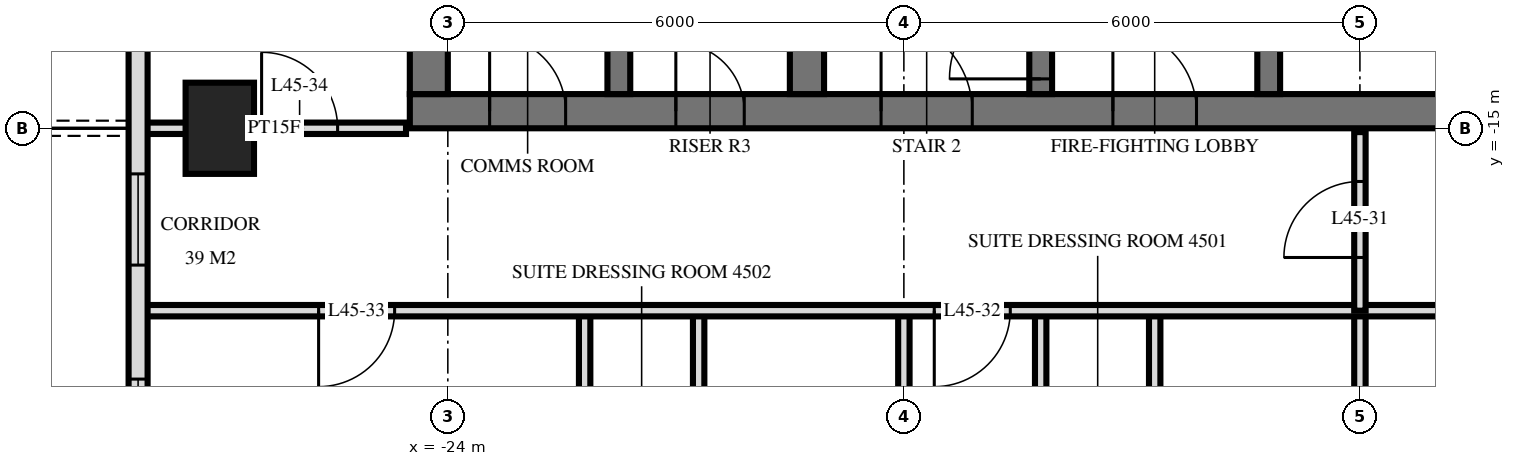
"""IFC4 building model, lengths in metres.
Left out: names, types, materials, properties, quantities, classifications, styles, units other than length and angle.
Written with IfcOpenShell. Run it as: python <this file> out.ifc"""

import sys

from ifc_helpers import new_model, si_unit, direction, frame, frame_2d, origin, origin_2d, place, context, subcontext, project, spatial, rectangle, extrude, element, fill, save


model = new_model("IFC4")
c1 = context("Model", 3, precision=1e-05, world=origin(), true_north=direction((0.0, 1.0)))
c2 = subcontext(c1, "Body", "Model", "MODEL_VIEW")
j1 = project(units=[si_unit("LENGTHUNIT", "METRE"), si_unit("PLANEANGLEUNIT", "RADIAN")], contexts=[c1])
p1 = place(None, origin())
s1 = spatial("IfcSite", under=j1, at=p1, CompositionType="ELEMENT")
p2 = place(p1, origin())
s2 = spatial("IfcBuilding", under=s1, at=p2, CompositionType="ELEMENT")
p3 = place(p2, frame((0.0, 0.0, 174.0)))
s3 = spatial("IfcBuildingStorey", under=s2, at=p3, CompositionType="ELEMENT", Elevation=174.0)
p4 = place(p3, frame((-27.0, -15.0, 0.0), z_axis=(0.0, 0.0, 1.0), x_axis=(0.0, 1.0, 0.0)))
e1 = element("IfcColumn", 1, at=p4, inside=s3, PredefinedType="COLUMN", context=c2, shape_type="SweptSolid", body=[
    extrude(rectangle(XDim=1.2, YDim=0.9, at=origin_2d()), origin(), (0.0, 0.0, 1.0), 3.6),
])
p5 = place(p3, frame((-24.5, -14.775, 0.0), z_axis=(0.0, 0.0, 1.0), x_axis=(1.0, 0.0, 0.0)))
e2 = element("IfcWall", 2, at=p5, inside=s3, PredefinedType="SHEAR", context=c2, shape_type="SweptSolid", body=[
    extrude(rectangle(XDim=14.5, YDim=0.45, at=frame_2d((7.25, 0.0))), origin(), (0.0, 0.0, 1.0), 3.6),
])
p6 = place(p5, frame((6.2, 0.0, 0.0)))
e3 = element("IfcOpeningElement", 3, at=p6, cuts=e2, PredefinedType="OPENING", context=c2, shape_type="SweptSolid", body=[
    extrude(rectangle(XDim=1.2, YDim=2.1, at=frame_2d((0.6, 1.05))), frame((0.0, 0.235, 0.0), z_axis=(0.0, -1.0, 0.0), x_axis=(1.0, 0.0, 0.0)), (0.0, 0.0, 1.0), 0.47),
])
p7 = place(p5, frame((9.25, 0.0, 0.0)))
e4 = element("IfcOpeningElement", 4, at=p7, cuts=e2, PredefinedType="OPENING", context=c2, shape_type="SweptSolid", body=[
    extrude(rectangle(XDim=1.1, YDim=2.1, at=frame_2d((0.55, 1.05))), frame((0.0, 0.235, 0.0), z_axis=(0.0, -1.0, 0.0), x_axis=(1.0, 0.0, 0.0)), (0.0, 0.0, 1.0), 0.47),
])
p8 = place(p5, frame((3.5, 0.0, 0.0)))
e5 = element("IfcOpeningElement", 5, at=p8, cuts=e2, PredefinedType="OPENING", context=c2, shape_type="SweptSolid", body=[
    extrude(rectangle(XDim=0.9, YDim=2.1, at=frame_2d((0.45, 1.05))), frame((0.0, 0.235, 0.0), z_axis=(0.0, -1.0, 0.0), x_axis=(1.0, 0.0, 0.0)), (0.0, 0.0, 1.0), 0.47),
])
p9 = place(p5, frame((1.05, 0.0, 0.0)))
e6 = element("IfcOpeningElement", 6, at=p9, cuts=e2, PredefinedType="OPENING", context=c2, shape_type="SweptSolid", body=[
    extrude(rectangle(XDim=1.0, YDim=2.1, at=frame_2d((0.5, 1.05))), frame((0.0, 0.235, 0.0), z_axis=(0.0, -1.0, 0.0), x_axis=(1.0, 0.0, 0.0)), (0.0, 0.0, 1.0), 0.47),
])
p10 = place(p3, frame((-24.25, -14.55, 0.0), z_axis=(0.0, 0.0, 1.0), x_axis=(0.0, 1.0, 0.0)))
e7 = element("IfcWall", 7, at=p10, inside=s3, PredefinedType="SHEAR", context=c2, shape_type="SweptSolid", body=[
    extrude(rectangle(XDim=14.1, YDim=0.5, at=frame_2d((7.05, 0.0))), origin(), (0.0, 0.0, 1.0), 3.6),
])
p11 = place(p3, frame((-13.2, -14.55, 0.0), z_axis=(0.0, 0.0, 1.0), x_axis=(0.0, 1.0, 0.0)))
e8 = element("IfcWall", 8, at=p11, inside=s3, PredefinedType="SHEAR", context=c2, shape_type="SweptSolid", body=[
    extrude(rectangle(XDim=5.4, YDim=0.3, at=frame_2d((2.7, 0.0))), origin(), (0.0, 0.0, 1.0), 3.6),
])
p12 = place(p11, frame((4.0, 0.0, 0.0)))
e9 = element("IfcOpeningElement", 9, at=p12, cuts=e8, PredefinedType="OPENING", context=c2, shape_type="SweptSolid", body=[
    extrude(rectangle(XDim=1.2, YDim=2.1, at=frame_2d((0.6, 1.05))), frame((0.0, 0.16, 0.0), z_axis=(0.0, -1.0, 0.0), x_axis=(1.0, 0.0, 0.0)), (0.0, 0.0, 1.0), 0.32),
])
p13 = place(p3, frame((-16.2, -14.55, 0.0), z_axis=(0.0, 0.0, 1.0), x_axis=(0.0, 1.0, 0.0)))
e10 = element("IfcWall", 10, at=p13, inside=s3, PredefinedType="SHEAR", context=c2, shape_type="SweptSolid", body=[
    extrude(rectangle(XDim=5.4, YDim=0.3, at=frame_2d((2.7, 0.0))), origin(), (0.0, 0.0, 1.0), 3.6),
])
p14 = place(p13, frame((0.2, 0.0, 0.0)))
e11 = element("IfcOpeningElement", 11, at=p14, cuts=e10, PredefinedType="OPENING", context=c2, shape_type="SweptSolid", body=[
    extrude(rectangle(XDim=1.2, YDim=2.1, at=frame_2d((0.6, 1.05))), frame((0.0, 0.16, 0.0), z_axis=(0.0, -1.0, 0.0), x_axis=(1.0, 0.0, 0.0)), (0.0, 0.0, 1.0), 0.32),
])
p15 = place(p3, frame((-19.275, -14.55, 0.0), z_axis=(0.0, 0.0, 1.0), x_axis=(0.0, 1.0, 0.0)))
e12 = element("IfcWall", 12, at=p15, inside=s3, PredefinedType="SHEAR", context=c2, shape_type="SweptSolid", body=[
    extrude(rectangle(XDim=5.4, YDim=0.45, at=frame_2d((2.7, 0.0))), origin(), (0.0, 0.0, 1.0), 3.6),
])
p16 = place(p3, frame((-21.75, -14.55, 0.0), z_axis=(0.0, 0.0, 1.0), x_axis=(0.0, 1.0, 0.0)))
e13 = element("IfcWall", 13, at=p16, inside=s3, PredefinedType="SHEAR", context=c2, shape_type="SweptSolid", body=[
    extrude(rectangle(XDim=5.4, YDim=0.3, at=frame_2d((2.7, 0.0))), origin(), (0.0, 0.0, 1.0), 3.6),
])
p17 = place(p3, frame((-28.075, -3.325, 0.0), z_axis=(0.0, 0.0, 1.0), x_axis=(0.0, -1.0, 0.0)))
e14 = element("IfcWall", 14, at=p17, inside=s3, PredefinedType="SOLIDWALL", context=c2, shape_type="SweptSolid", body=[
    extrude(rectangle(XDim=25.951, YDim=0.25, at=frame_2d((12.975, 0.0))), origin(), (0.0, 0.0, 1.0), 3.3),
])
p18 = place(p17, frame((7.525, 0.0, 0.0)))
e15 = element("IfcOpeningElement", 15, at=p18, cuts=e14, PredefinedType="OPENING", context=c2, shape_type="SweptSolid", body=[
    extrude(rectangle(XDim=1.8, YDim=2.4, at=frame_2d((0.9, 1.2))), frame((0.0, 0.135, 0.0), z_axis=(0.0, -1.0, 0.0), x_axis=(1.0, 0.0, 0.0)), (0.0, 0.0, 1.0), 0.27),
])
p19 = place(p17, frame((12.275, 0.0, 0.3)))
e16 = element("IfcOpeningElement", 16, at=p19, cuts=e14, PredefinedType="OPENING", context=c2, shape_type="SweptSolid", body=[
    extrude(rectangle(XDim=1.2, YDim=2.1, at=frame_2d((0.6, 1.05))), frame((0.0, 0.135, 0.0), z_axis=(0.0, -1.0, 0.0), x_axis=(1.0, 0.0, 0.0)), (0.0, 0.0, 1.0), 0.27),
])
p20 = place(p17, frame((14.975, 0.0, 0.3)))
e17 = element("IfcOpeningElement", 17, at=p20, cuts=e14, PredefinedType="OPENING", context=c2, shape_type="SweptSolid", body=[
    extrude(rectangle(XDim=2.4, YDim=2.1, at=frame_2d((1.2, 1.05))), frame((0.0, 0.135, 0.0), z_axis=(0.0, -1.0, 0.0), x_axis=(1.0, 0.0, 0.0)), (0.0, 0.0, 1.0), 0.27),
])
p21 = place(p17, frame((18.175, 0.0, 0.0)))
e18 = element("IfcOpeningElement", 18, at=p21, cuts=e14, PredefinedType="OPENING", context=c2, shape_type="SweptSolid", body=[
    extrude(rectangle(XDim=1.8, YDim=2.4, at=frame_2d((0.9, 1.2))), frame((0.0, 0.135, 0.0), z_axis=(0.0, -1.0, 0.0), x_axis=(1.0, 0.0, 0.0)), (0.0, 0.0, 1.0), 0.27),
])
p22 = place(p17, frame((21.075, 0.0, 0.0)))
e19 = element("IfcOpeningElement", 19, at=p22, cuts=e14, PredefinedType="OPENING", context=c2, shape_type="SweptSolid", body=[
    extrude(rectangle(XDim=1.8, YDim=2.4, at=frame_2d((0.9, 1.2))), frame((0.0, 0.135, 0.0), z_axis=(0.0, -1.0, 0.0), x_axis=(1.0, 0.0, 0.0)), (0.0, 0.0, 1.0), 0.27),
])
p23 = place(p17, frame((23.825, 0.0, 0.3)))
e20 = element("IfcOpeningElement", 20, at=p23, cuts=e14, PredefinedType="OPENING", context=c2, shape_type="SweptSolid", body=[
    extrude(rectangle(XDim=1.8, YDim=2.1, at=frame_2d((0.9, 1.05))), frame((0.0, 0.135, 0.0), z_axis=(0.0, -1.0, 0.0), x_axis=(1.0, 0.0, 0.0)), (0.0, 0.0, 1.0), 0.27),
])
p24 = place(p3, frame((-12.0, -17.4, 0.0), z_axis=(0.0, 0.0, 1.0), x_axis=(0.0, 1.0, 0.0)))
e21 = element("IfcWall", 21, at=p24, inside=s3, PredefinedType="PARTITIONING", context=c2, shape_type="SweptSolid", body=[
    extrude(rectangle(XDim=2.35, YDim=0.15, at=frame_2d((1.175, 0.0))), origin(), (0.0, 0.0, 1.0), 3.32),
])
p25 = place(p24, frame((0.7, 0.0, 0.0)))
e22 = element("IfcOpeningElement", 22, at=p25, cuts=e21, PredefinedType="OPENING", context=c2, shape_type="SweptSolid", body=[
    extrude(rectangle(XDim=1.0, YDim=2.1, at=frame_2d((0.5, 1.05))), frame((0.0, 0.085, 0.0), z_axis=(0.0, -1.0, 0.0), x_axis=(1.0, 0.0, 0.0)), (0.0, 0.0, 1.0), 0.17),
])
p26 = place(p3, frame((-12.0, -33.62, 0.0), z_axis=(0.0, 0.0, 1.0), x_axis=(0.0, 1.0, 0.0)))
e23 = element("IfcWall", 23, at=p26, inside=s3, PredefinedType="PARTITIONING", context=c2, shape_type="SweptSolid", body=[
    extrude(rectangle(XDim=16.22, YDim=0.15, at=frame_2d((8.11, 0.0))), origin(), (0.0, 0.0, 1.0), 3.32),
])
p27 = place(p3, frame((-14.7, -22.4, 0.0), z_axis=(0.0, 0.0, 1.0), x_axis=(0.0, 1.0, 0.0)))
e24 = element("IfcWall", 24, at=p27, inside=s3, PredefinedType="PARTITIONING", context=c2, shape_type="SweptSolid", body=[
    extrude(rectangle(XDim=5.0, YDim=0.15, at=frame_2d((2.5, 0.0))), origin(), (0.0, 0.0, 1.0), 3.32),
])
p28 = place(p3, frame((-16.2, -22.4, 0.0), z_axis=(0.0, 0.0, 1.0), x_axis=(0.0, 1.0, 0.0)))
e25 = element("IfcWall", 25, at=p28, inside=s3, PredefinedType="PARTITIONING", context=c2, shape_type="SweptSolid", body=[
    extrude(rectangle(XDim=5.0, YDim=0.15, at=frame_2d((2.5, 0.0))), origin(), (0.0, 0.0, 1.0), 3.32),
])
p29 = place(p28, frame((2.05, 0.0, 0.0)))
e26 = element("IfcOpeningElement", 26, at=p29, cuts=e25, PredefinedType="OPENING", context=c2, shape_type="SweptSolid", body=[
    extrude(rectangle(XDim=0.9, YDim=2.1, at=frame_2d((0.45, 1.05))), frame((0.0, 0.085, 0.0), z_axis=(0.0, -1.0, 0.0), x_axis=(1.0, 0.0, 0.0)), (0.0, 0.0, 1.0), 0.17),
])
p30 = place(p3, frame((-18.0, -33.62, 0.0), z_axis=(0.0, 0.0, 1.0), x_axis=(0.0, 1.0, 0.0)))
e27 = element("IfcWall", 27, at=p30, inside=s3, PredefinedType="PARTITIONING", context=c2, shape_type="SweptSolid", body=[
    extrude(rectangle(XDim=16.22, YDim=0.15, at=frame_2d((8.11, 0.0))), origin(), (0.0, 0.0, 1.0), 3.32),
])
p31 = place(p3, frame((-20.7, -21.6, 0.0), z_axis=(0.0, 0.0, 1.0), x_axis=(0.0, 1.0, 0.0)))
e28 = element("IfcWall", 28, at=p31, inside=s3, PredefinedType="PARTITIONING", context=c2, shape_type="SweptSolid", body=[
    extrude(rectangle(XDim=4.2, YDim=0.15, at=frame_2d((2.1, 0.0))), origin(), (0.0, 0.0, 1.0), 3.32),
])
p32 = place(p3, frame((-22.2, -21.6, 0.0), z_axis=(0.0, 0.0, 1.0), x_axis=(0.0, 1.0, 0.0)))
e29 = element("IfcWall", 29, at=p32, inside=s3, PredefinedType="PARTITIONING", context=c2, shape_type="SweptSolid", body=[
    extrude(rectangle(XDim=4.2, YDim=0.15, at=frame_2d((2.1, 0.0))), origin(), (0.0, 0.0, 1.0), 3.32),
])
p33 = place(p32, frame((1.65, 0.0, 0.0)))
e30 = element("IfcOpeningElement", 30, at=p33, cuts=e29, PredefinedType="OPENING", context=c2, shape_type="SweptSolid", body=[
    extrude(rectangle(XDim=0.9, YDim=2.1, at=frame_2d((0.45, 1.05))), frame((0.0, 0.085, 0.0), z_axis=(0.0, -1.0, 0.0), x_axis=(1.0, 0.0, 0.0)), (0.0, 0.0, 1.0), 0.17),
])
p34 = place(p3, frame((-28.02, -17.4, 0.0), z_axis=(0.0, 0.0, 1.0), x_axis=(1.0, 0.0, 0.0)))
e31 = element("IfcWall", 31, at=p34, inside=s3, PredefinedType="PARTITIONING", context=c2, shape_type="SweptSolid", body=[
    extrude(rectangle(XDim=56.04, YDim=0.15, at=frame_2d((28.02, 0.0))), origin(), (0.0, 0.0, 1.0), 3.32),
])
p35 = place(p34, frame((10.42, 0.0, 0.0)))
e32 = element("IfcOpeningElement", 32, at=p35, cuts=e31, PredefinedType="OPENING", context=c2, shape_type="SweptSolid", body=[
    extrude(rectangle(XDim=1.0, YDim=2.1, at=frame_2d((0.5, 1.05))), frame((0.0, 0.085, 0.0), z_axis=(0.0, -1.0, 0.0), x_axis=(1.0, 0.0, 0.0)), (0.0, 0.0, 1.0), 0.17),
])
p36 = place(p34, frame((2.32, 0.0, 0.0)))
e33 = element("IfcOpeningElement", 33, at=p36, cuts=e31, PredefinedType="OPENING", context=c2, shape_type="SweptSolid", body=[
    extrude(rectangle(XDim=1.0, YDim=2.1, at=frame_2d((0.5, 1.05))), frame((0.0, 0.085, 0.0), z_axis=(0.0, -1.0, 0.0), x_axis=(1.0, 0.0, 0.0)), (0.0, 0.0, 1.0), 0.17),
])
p37 = place(p34, frame((49.72, 0.0, 0.0)))
e34 = element("IfcOpeningElement", 34, at=p37, cuts=e31, PredefinedType="OPENING", context=c2, shape_type="SweptSolid", body=[
    extrude(rectangle(XDim=1.0, YDim=2.1, at=frame_2d((0.5, 1.05))), frame((0.0, 0.085, 0.0), z_axis=(0.0, -1.0, 0.0), x_axis=(1.0, 0.0, 0.0)), (0.0, 0.0, 1.0), 0.17),
])
p38 = place(p34, frame((23.02, 0.0, 0.0)))
e35 = element("IfcOpeningElement", 35, at=p38, cuts=e31, PredefinedType="OPENING", context=c2, shape_type="SweptSolid", body=[
    extrude(rectangle(XDim=1.0, YDim=2.1, at=frame_2d((0.5, 1.05))), frame((0.0, 0.085, 0.0), z_axis=(0.0, -1.0, 0.0), x_axis=(1.0, 0.0, 0.0)), (0.0, 0.0, 1.0), 0.17),
])
p39 = place(p34, frame((35.02, 0.0, 0.0)))
e36 = element("IfcOpeningElement", 36, at=p39, cuts=e31, PredefinedType="OPENING", context=c2, shape_type="SweptSolid", body=[
    extrude(rectangle(XDim=1.0, YDim=2.1, at=frame_2d((0.5, 1.05))), frame((0.0, 0.085, 0.0), z_axis=(0.0, -1.0, 0.0), x_axis=(1.0, 0.0, 0.0)), (0.0, 0.0, 1.0), 0.17),
])
p40 = place(p3, frame((-28.02, -15.0, 0.0), z_axis=(0.0, 0.0, 1.0), x_axis=(1.0, 0.0, 0.0)))
e37 = element("IfcWall", 37, at=p40, inside=s3, PredefinedType="PARTITIONING", context=c2, shape_type="SweptSolid", body=[
    extrude(rectangle(XDim=3.47, YDim=0.15, at=frame_2d((1.735, 0.0))), origin(), (0.0, 0.0, 1.0), 3.32),
])
p41 = place(p40, frame((1.57, 0.0, 0.0)))
e38 = element("IfcOpeningElement", 38, at=p41, cuts=e37, PredefinedType="OPENING", context=c2, shape_type="SweptSolid", body=[
    extrude(rectangle(XDim=1.0, YDim=2.1, at=frame_2d((0.5, 1.05))), frame((0.0, 0.085, 0.0), z_axis=(0.0, -1.0, 0.0), x_axis=(1.0, 0.0, 0.0)), (0.0, 0.0, 1.0), 0.17),
])
p42 = place(p19, origin())
e39 = element("IfcWindow", 39, at=p42, inside=s3, PartitioningType="SINGLE_PANEL", PredefinedType="WINDOW", context=c2, shape_type="SweptSolid", body=[
    extrude(rectangle(XDim=1.2, YDim=2.1, at=frame_2d((0.6, 1.05))), frame((0.0, 0.03, 0.0), z_axis=(0.0, -1.0, 0.0), x_axis=(1.0, 0.0, 0.0)), (0.0, 0.0, 1.0), 0.06),
])
fill(e16, e39)
p43 = place(p20, origin())
e40 = element("IfcWindow", 40, at=p43, inside=s3, PartitioningType="SINGLE_PANEL", PredefinedType="WINDOW", context=c2, shape_type="SweptSolid", body=[
    extrude(rectangle(XDim=2.4, YDim=2.1, at=frame_2d((1.2, 1.05))), frame((0.0, 0.03, 0.0), z_axis=(0.0, -1.0, 0.0), x_axis=(1.0, 0.0, 0.0)), (0.0, 0.0, 1.0), 0.06),
])
fill(e17, e40)
p44 = place(p6, origin())
e41 = element("IfcDoor", 41, at=p44, inside=s3, OperationType="SINGLE_SWING_RIGHT", PredefinedType="DOOR", context=c2, shape_type="SweptSolid", body=[
    extrude(rectangle(XDim=1.2, YDim=2.1, at=frame_2d((0.6, 1.05))), frame((0.0, 0.025, 0.0), z_axis=(0.0, -1.0, 0.0), x_axis=(1.0, 0.0, 0.0)), (0.0, 0.0, 1.0), 0.05),
])
fill(e3, e41)
p45 = place(p7, origin())
e42 = element("IfcDoor", 42, at=p45, inside=s3, OperationType="SINGLE_SWING_RIGHT", PredefinedType="DOOR", context=c2, shape_type="SweptSolid", body=[
    extrude(rectangle(XDim=1.1, YDim=2.1, at=frame_2d((0.55, 1.05))), frame((0.0, 0.025, 0.0), z_axis=(0.0, -1.0, 0.0), x_axis=(1.0, 0.0, 0.0)), (0.0, 0.0, 1.0), 0.05),
])
fill(e4, e42)
p46 = place(p8, origin())
e43 = element("IfcDoor", 43, at=p46, inside=s3, OperationType="SINGLE_SWING_RIGHT", PredefinedType="DOOR", context=c2, shape_type="SweptSolid", body=[
    extrude(rectangle(XDim=0.9, YDim=2.1, at=frame_2d((0.45, 1.05))), frame((0.0, 0.025, 0.0), z_axis=(0.0, -1.0, 0.0), x_axis=(1.0, 0.0, 0.0)), (0.0, 0.0, 1.0), 0.05),
])
fill(e5, e43)
p47 = place(p9, origin())
e44 = element("IfcDoor", 44, at=p47, inside=s3, OperationType="SINGLE_SWING_RIGHT", PredefinedType="DOOR", context=c2, shape_type="SweptSolid", body=[
    extrude(rectangle(XDim=1.0, YDim=2.1, at=frame_2d((0.5, 1.05))), frame((0.0, 0.025, 0.0), z_axis=(0.0, -1.0, 0.0), x_axis=(1.0, 0.0, 0.0)), (0.0, 0.0, 1.0), 0.05),
])
fill(e6, e44)
p48 = place(p14, origin())
e45 = element("IfcDoor", 45, at=p48, inside=s3, OperationType="SINGLE_SWING_RIGHT", PredefinedType="DOOR", context=c2, shape_type="SweptSolid", body=[
    extrude(rectangle(XDim=1.2, YDim=2.1, at=frame_2d((0.6, 1.05))), frame((0.0, 0.025, 0.0), z_axis=(0.0, -1.0, 0.0), x_axis=(1.0, 0.0, 0.0)), (0.0, 0.0, 1.0), 0.05),
])
fill(e11, e45)
p49 = place(p25, origin())
e46 = element("IfcDoor", 46, at=p49, inside=s3, OperationType="SINGLE_SWING_RIGHT", PredefinedType="DOOR", context=c2, shape_type="SweptSolid", body=[
    extrude(rectangle(XDim=1.0, YDim=2.1, at=frame_2d((0.5, 1.05))), frame((0.0, 0.025, 0.0), z_axis=(0.0, -1.0, 0.0), x_axis=(1.0, 0.0, 0.0)), (0.0, 0.0, 1.0), 0.05),
])
fill(e22, e46)
p50 = place(p35, frame((0.5, 0.0, 0.0), z_axis=(0.0, 0.0, 1.0), x_axis=(-1.0, 0.0, 0.0)))
e47 = element("IfcDoor", 47, at=p50, inside=s3, OperationType="SINGLE_SWING_LEFT", PredefinedType="DOOR", context=c2, shape_type="SweptSolid", body=[
    extrude(rectangle(XDim=1.0, YDim=2.1, at=frame_2d((0.0, 1.05))), frame((0.0, -0.025, 0.0), z_axis=(0.0, 1.0, 0.0), x_axis=(-1.0, 0.0, 0.0)), (0.0, 0.0, 1.0), 0.05),
])
fill(e32, e47)
p51 = place(p36, frame((0.5, 0.0, 0.0), z_axis=(0.0, 0.0, 1.0), x_axis=(-1.0, 0.0, 0.0)))
e48 = element("IfcDoor", 48, at=p51, inside=s3, OperationType="SINGLE_SWING_LEFT", PredefinedType="DOOR", context=c2, shape_type="SweptSolid", body=[
    extrude(rectangle(XDim=1.0, YDim=2.1, at=frame_2d((0.0, 1.05))), frame((0.0, -0.025, 0.0), z_axis=(0.0, 1.0, 0.0), x_axis=(-1.0, 0.0, 0.0)), (0.0, 0.0, 1.0), 0.05),
])
fill(e33, e48)
p52 = place(p41, origin())
e49 = element("IfcDoor", 49, at=p52, inside=s3, OperationType="SINGLE_SWING_RIGHT", PredefinedType="DOOR", context=c2, shape_type="SweptSolid", body=[
    extrude(rectangle(XDim=1.0, YDim=2.1, at=frame_2d((0.5, 1.05))), frame((0.0, 0.025, 0.0), z_axis=(0.0, -1.0, 0.0), x_axis=(1.0, 0.0, 0.0)), (0.0, 0.0, 1.0), 0.05),
])
fill(e38, e49)
save(model, sys.argv[1])
